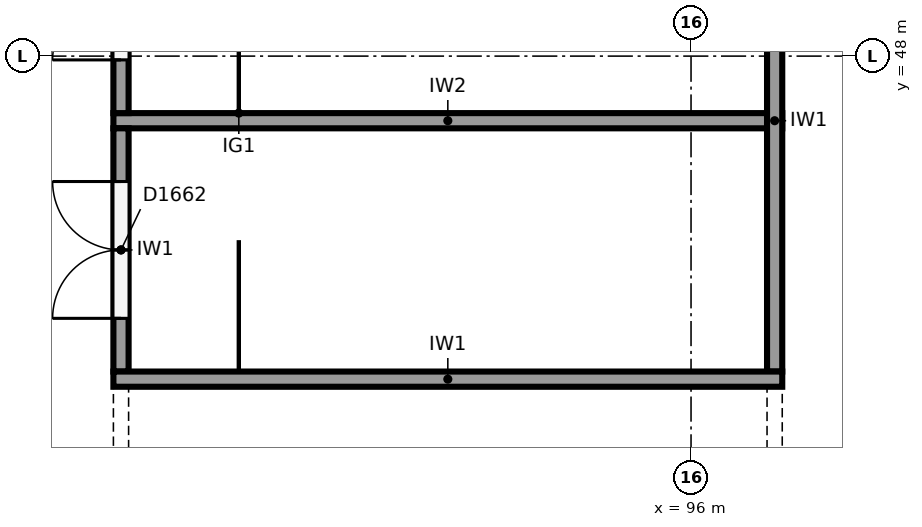
"""IFC4 building model, lengths in metres.
Left out: names, types, materials, properties, quantities, classifications, styles, units other than length and angle.
Written with IfcOpenShell. Run it as: python <this file> out.ifc"""

import sys

from ifc_helpers import new_model, si_unit, direction, frame, frame_2d, origin, place, context, subcontext, project, spatial, polyline, rectangle, outline, extrude, element, fill, save


model = new_model("IFC4")
c1 = context("Model", 3, precision=1e-05, world=origin(), true_north=direction((0.0, 1.0)))
c2 = subcontext(c1, "Body", "Model", "MODEL_VIEW")
j1 = project(units=[si_unit("LENGTHUNIT", "METRE"), si_unit("PLANEANGLEUNIT", "RADIAN")], contexts=[c1])
p1 = place(None, origin())
s1 = spatial("IfcSite", under=j1, at=p1, CompositionType="ELEMENT")
p2 = place(p1, origin())
s2 = spatial("IfcBuilding", under=s1, at=p2, CompositionType="ELEMENT")
p3 = place(p2, frame((0.0, 0.0, 24.0)))
s3 = spatial("IfcBuildingStorey", under=s2, at=p3, CompositionType="ELEMENT", Elevation=24.0)
p4 = place(p3, frame((101.161, 43.311, 0.0), z_axis=(0.0, 0.0, 1.0), x_axis=(-0.477867771117, -0.878431780691, 0.0)))
e1 = element("IfcWall", 1, at=p4, inside=s3, PredefinedType="SOLIDWALL", context=c2, shape_type="SweptSolid", body=[
    extrude(rectangle(XDim=13.28, YDim=0.32, at=frame_2d((6.64, 0.0))), origin(), (0.0, 0.0, 1.0), 6.0),
])
p5 = place(p3, frame((101.337, 43.215, 6.0), z_axis=(0.0, 0.0, 1.0), x_axis=(-0.477867771117, -0.878431780691, 0.0)))
e2 = element("IfcWall", 2, at=p5, inside=s3, PredefinedType="SOLIDWALL", context=c2, shape_type="SweptSolid", body=[
    extrude(outline(polyline([(0.0, 0.0), (13.28, 0.0), (13.28, 4.105), (0.0, 10.451), (0.0, 0.0)])), frame((0.0, 0.16, 0.0), z_axis=(0.0, -1.0, 0.0), x_axis=(1.0, 0.0, 0.0)), (0.0, 0.0, 1.0), 0.32),
])
p6 = place(p3, frame((97.815, 50.034, 0.0), z_axis=(0.0, 0.0, 1.0), x_axis=(0.519367009964, -0.854551291007, 0.0)))
e3 = element("IfcWall", 3, at=p6, inside=s3, PredefinedType="SOLIDWALL", context=c2, shape_type="SweptSolid", body=[
    extrude(rectangle(XDim=6.732, YDim=0.32, at=frame_2d((3.366, 0.0))), origin(), (0.0, 0.0, 1.0), 6.0),
])
p7 = place(p6, frame((5.25, 0.0, 1.0)))
e4 = element("IfcOpeningElement", 4, at=p7, cuts=e3, PredefinedType="OPENING", context=c2, shape_type="SweptSolid", body=[
    extrude(rectangle(XDim=0.9, YDim=3.25, at=frame_2d((0.45, 1.625))), frame((0.0, 0.17, 0.0), z_axis=(0.0, -1.0, 0.0), x_axis=(1.0, 0.0, 0.0)), (0.0, 0.0, 1.0), 0.34),
])
p8 = place(p3, frame((97.815, 50.034, 6.0), z_axis=(0.0, 0.0, 1.0), x_axis=(0.519367009964, -0.854551291007, 0.0)))
e5 = element("IfcWall", 5, at=p8, inside=s3, PredefinedType="SOLIDWALL", context=c2, shape_type="SweptSolid", body=[
    extrude(outline(polyline([(0.0, 0.0), (6.732, 0.0), (6.732, 10.442), (0.0, 7.095), (0.0, 0.0)])), frame((0.0, 0.16, 0.0), z_axis=(0.0, -1.0, 0.0), x_axis=(1.0, 0.0, 0.0)), (0.0, 0.0, 1.0), 0.32),
])
p9 = place(p8, frame((5.25, 0.0, 1.6)))
e6 = element("IfcOpeningElement", 6, at=p9, cuts=e5, PredefinedType="OPENING", context=c2, shape_type="SweptSolid", body=[
    extrude(rectangle(XDim=0.9, YDim=3.0, at=frame_2d((0.45, 1.5))), frame((0.0, 0.17, 0.0), z_axis=(0.0, -1.0, 0.0), x_axis=(1.0, 0.0, 0.0)), (0.0, 0.0, 1.0), 0.34),
])
p10 = place(p3, frame((97.2, 43.75, 0.0), z_axis=(0.0, 0.0, 1.0), x_axis=(-1.0, 0.0, 0.0)))
e7 = element("IfcWall", 7, at=p10, inside=s3, PredefinedType="SHEAR", context=c2, shape_type="SweptSolid", body=[
    extrude(rectangle(XDim=8.8, YDim=0.2, at=frame_2d((4.4, 0.0))), origin(), (0.0, 0.0, 1.0), 5.75),
])
for number, where, z_axis, x_axis in (
    (8, (97.1, 37.05, 0.0), (0.0, 0.0, 1.0), (0.0, 1.0, 0.0)),
    (9, (97.1, 43.85, 0.0), (0.0, 0.0, 1.0), (0.0, 1.0, 0.0)),
):
    element("IfcWall", number, at=place(p3, frame(where, z_axis=z_axis, x_axis=x_axis)), inside=s3, PredefinedType="SHEAR", context=c2, shape_type="SweptSolid", body=[
        extrude(rectangle(XDim=6.6, YDim=0.2, at=frame_2d((3.3, 0.0))), origin(), (0.0, 0.0, 1.0), 5.75),
    ])
p11 = place(p3, frame((97.2, 47.15, 0.0), z_axis=(0.0, 0.0, 1.0), x_axis=(-1.0, 0.0, 0.0)))
e10 = element("IfcWall", 10, at=p11, inside=s3, PredefinedType="SHEAR", context=c2, shape_type="SweptSolid", body=[
    extrude(rectangle(XDim=8.8, YDim=0.2, at=frame_2d((4.4, 0.0))), origin(), (0.0, 0.0, 1.0), 5.75),
])
p12 = place(p3, frame((88.5, 40.45, 0.0), z_axis=(0.0, 0.0, 1.0), x_axis=(0.0, 1.0, 0.0)))
e11 = element("IfcWall", 11, at=p12, inside=s3, PredefinedType="SHEAR", context=c2, shape_type="SweptSolid", body=[
    extrude(rectangle(XDim=3.2, YDim=0.2, at=frame_2d((1.6, 0.0))), origin(), (0.0, 0.0, 1.0), 5.75),
])
p13 = place(p12, frame((0.7, 0.0, 0.0)))
e12 = element("IfcOpeningElement", 12, at=p13, cuts=e11, PredefinedType="OPENING", context=c2, shape_type="SweptSolid", body=[
    extrude(rectangle(XDim=1.8, YDim=2.1, at=frame_2d((0.9, 1.05))), frame((0.0, 0.11, 0.0), z_axis=(0.0, -1.0, 0.0), x_axis=(1.0, 0.0, 0.0)), (0.0, 0.0, 1.0), 0.22),
])
p14 = place(p3, frame((88.5, 43.85, 0.0), z_axis=(0.0, 0.0, 1.0), x_axis=(0.0, 1.0, 0.0)))
e13 = element("IfcWall", 13, at=p14, inside=s3, PredefinedType="SHEAR", context=c2, shape_type="SweptSolid", body=[
    extrude(rectangle(XDim=3.2, YDim=0.2, at=frame_2d((1.6, 0.0))), origin(), (0.0, 0.0, 1.0), 5.75),
])
p15 = place(p14, frame((0.7, 0.0, 0.0)))
e14 = element("IfcOpeningElement", 14, at=p15, cuts=e13, PredefinedType="OPENING", context=c2, shape_type="SweptSolid", body=[
    extrude(rectangle(XDim=1.8, YDim=2.1, at=frame_2d((0.9, 1.05))), frame((0.0, 0.11, 0.0), z_axis=(0.0, -1.0, 0.0), x_axis=(1.0, 0.0, 0.0)), (0.0, 0.0, 1.0), 0.22),
])
p16 = place(p3, frame((88.5, 47.25, 0.0), z_axis=(0.0, 0.0, 1.0), x_axis=(0.0, 1.0, 0.0)))
e15 = element("IfcWall", 15, at=p16, inside=s3, PredefinedType="SHEAR", context=c2, shape_type="SweptSolid", body=[
    extrude(rectangle(XDim=3.2, YDim=0.2, at=frame_2d((1.6, 0.0))), origin(), (0.0, 0.0, 1.0), 5.75),
])
p17 = place(p16, frame((0.7, 0.0, 0.0)))
e16 = element("IfcOpeningElement", 16, at=p17, cuts=e15, PredefinedType="OPENING", context=c2, shape_type="SweptSolid", body=[
    extrude(rectangle(XDim=1.8, YDim=2.1, at=frame_2d((0.9, 1.05))), frame((0.0, 0.11, 0.0), z_axis=(0.0, -1.0, 0.0), x_axis=(1.0, 0.0, 0.0)), (0.0, 0.0, 1.0), 0.22),
])
p18 = place(p13, origin())
e17 = element("IfcDoor", 17, at=p18, inside=s3, OperationType="DOUBLE_DOOR_SINGLE_SWING", PredefinedType="DOOR", context=c2, shape_type="SweptSolid", body=[
    extrude(rectangle(XDim=1.8, YDim=2.1, at=frame_2d((0.9, 1.05))), frame((0.0, 0.025, 0.0), z_axis=(0.0, -1.0, 0.0), x_axis=(1.0, 0.0, 0.0)), (0.0, 0.0, 1.0), 0.05),
])
fill(e12, e17)
p19 = place(p15, origin())
e18 = element("IfcDoor", 18, at=p19, inside=s3, OperationType="DOUBLE_DOOR_SINGLE_SWING", PredefinedType="DOOR", context=c2, shape_type="SweptSolid", body=[
    extrude(rectangle(XDim=1.8, YDim=2.1, at=frame_2d((0.9, 1.05))), frame((0.0, 0.025, 0.0), z_axis=(0.0, -1.0, 0.0), x_axis=(1.0, 0.0, 0.0)), (0.0, 0.0, 1.0), 0.05),
])
fill(e14, e18)
p20 = place(p17, origin())
e19 = element("IfcDoor", 19, at=p20, inside=s3, OperationType="DOUBLE_DOOR_SINGLE_SWING", PredefinedType="DOOR", context=c2, shape_type="SweptSolid", body=[
    extrude(rectangle(XDim=1.8, YDim=2.1, at=frame_2d((0.9, 1.05))), frame((0.0, 0.025, 0.0), z_axis=(0.0, -1.0, 0.0), x_axis=(1.0, 0.0, 0.0)), (0.0, 0.0, 1.0), 0.05),
])
fill(e16, e19)
save(model, sys.argv[1])
